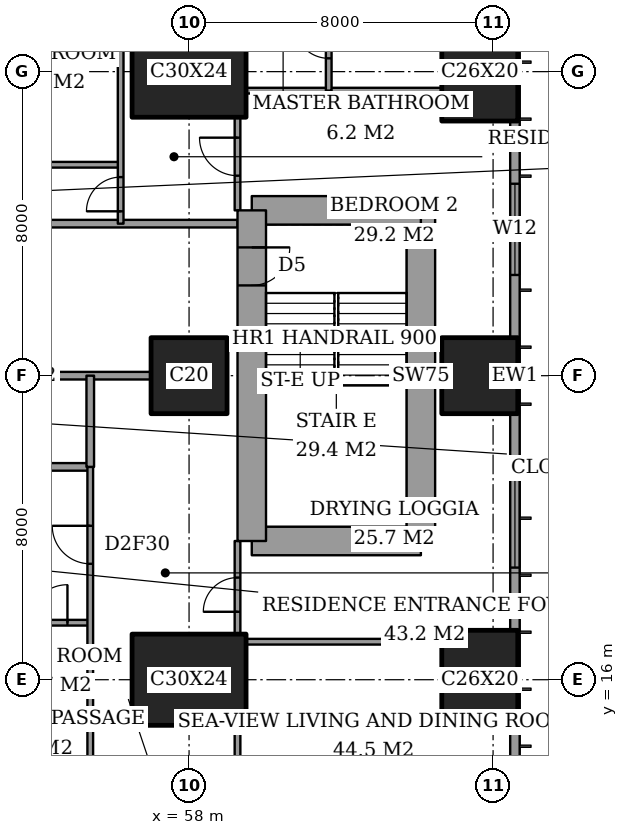
"""IFC4 building model, lengths in metres.
Left out: names, types, materials, properties, quantities, classifications, styles, units other than length and angle.
Written with IfcOpenShell. Run it as: python <this file> out.ifc"""

import sys

from ifc_helpers import new_model, si_unit, direction, frame, frame_2d, origin, origin_2d, place, context, subcontext, project, spatial, rectangle, extrude, element, fill, save


model = new_model("IFC4")
c1 = context("Model", 3, precision=1e-05, world=origin(), true_north=direction((0.0, 1.0)))
c2 = subcontext(c1, "Body", "Model", "MODEL_VIEW")
j1 = project(units=[si_unit("LENGTHUNIT", "METRE"), si_unit("PLANEANGLEUNIT", "RADIAN")], contexts=[c1])
p1 = place(None, origin())
s1 = spatial("IfcSite", under=j1, at=p1, CompositionType="ELEMENT")
p2 = place(p1, origin())
s2 = spatial("IfcBuilding", under=s1, at=p2, CompositionType="ELEMENT")
p3 = place(p2, frame((0.0, 0.0, 128.6)))
s3 = spatial("IfcBuildingStorey", under=s2, at=p3, CompositionType="ELEMENT", Elevation=128.6)
p4 = place(p3, frame((58.0, 16.0, 0.0), z_axis=(0.0, 0.0, 1.0), x_axis=(1.0, 0.0, 0.0)))
e1 = element("IfcColumn", 1, at=p4, inside=s3, PredefinedType="COLUMN", context=c2, shape_type="SweptSolid", body=[
    extrude(rectangle(XDim=3.0, YDim=2.4, at=origin_2d()), origin(), (0.0, 0.0, 1.0), 3.6),
])
p5 = place(p3, frame((58.0, 24.0, 0.0), z_axis=(0.0, 0.0, 1.0), x_axis=(1.0, 0.0, 0.0)))
e2 = element("IfcColumn", 2, at=p5, inside=s3, PredefinedType="COLUMN", context=c2, shape_type="SweptSolid", body=[
    extrude(rectangle(XDim=2.0, YDim=2.0, at=origin_2d()), origin(), (0.0, 0.0, 1.0), 3.6),
])
p6 = place(p3, frame((58.0, 32.0, 0.0), z_axis=(0.0, 0.0, 1.0), x_axis=(1.0, 0.0, 0.0)))
e3 = element("IfcColumn", 3, at=p6, inside=s3, PredefinedType="COLUMN", context=c2, shape_type="SweptSolid", body=[
    extrude(rectangle(XDim=3.0, YDim=2.4, at=origin_2d()), origin(), (0.0, 0.0, 1.0), 3.6),
])
p7 = place(p3, frame((65.65, 16.0, 0.0), z_axis=(0.0, 0.0, 1.0), x_axis=(0.0, 1.0, 0.0)))
e4 = element("IfcColumn", 4, at=p7, inside=s3, PredefinedType="COLUMN", context=c2, shape_type="SweptSolid", body=[
    extrude(rectangle(XDim=2.6, YDim=2.0, at=origin_2d()), origin(), (0.0, 0.0, 1.0), 3.6),
])
p8 = place(p3, frame((65.65, 24.0, 0.0), z_axis=(0.0, 0.0, 1.0), x_axis=(1.0, 0.0, 0.0)))
e5 = element("IfcColumn", 5, at=p8, inside=s3, PredefinedType="COLUMN", context=c2, shape_type="SweptSolid", body=[
    extrude(rectangle(XDim=2.0, YDim=2.0, at=origin_2d()), origin(), (0.0, 0.0, 1.0), 3.6),
])
p9 = place(p3, frame((65.65, 32.0, 0.0), z_axis=(0.0, 0.0, 1.0), x_axis=(0.0, 1.0, 0.0)))
e6 = element("IfcColumn", 6, at=p9, inside=s3, PredefinedType="COLUMN", context=c2, shape_type="SweptSolid", body=[
    extrude(rectangle(XDim=2.6, YDim=2.0, at=origin_2d()), origin(), (0.0, 0.0, 1.0), 3.6),
])
p10 = place(p3, frame((59.65, 19.65, 0.0), z_axis=(0.0, 0.0, 1.0), x_axis=(1.0, 0.0, 0.0)))
e7 = element("IfcWall", 7, at=p10, inside=s3, PredefinedType="SHEAR", context=c2, shape_type="SweptSolid", body=[
    extrude(rectangle(XDim=4.45, YDim=0.75, at=frame_2d((2.225, 0.0))), origin(), (0.0, 0.0, 1.0), 3.6),
])
p11 = place(p3, frame((64.1, 19.65, 0.0), z_axis=(0.0, 0.0, 1.0), x_axis=(0.0, 1.0, 0.0)))
e8 = element("IfcWall", 8, at=p11, inside=s3, PredefinedType="SHEAR", context=c2, shape_type="SweptSolid", body=[
    extrude(rectangle(XDim=8.7, YDim=0.75, at=frame_2d((4.35, 0.0))), origin(), (0.0, 0.0, 1.0), 3.6),
])
p12 = place(p3, frame((64.1, 28.35, 0.0), z_axis=(0.0, 0.0, 1.0), x_axis=(-1.0, 0.0, 0.0)))
e9 = element("IfcWall", 9, at=p12, inside=s3, PredefinedType="SHEAR", context=c2, shape_type="SweptSolid", body=[
    extrude(rectangle(XDim=4.45, YDim=0.75, at=frame_2d((2.225, 0.0))), origin(), (0.0, 0.0, 1.0), 3.6),
])
p13 = place(p3, frame((59.65, 28.35, 0.0), z_axis=(0.0, 0.0, 1.0), x_axis=(0.0, -1.0, 0.0)))
e10 = element("IfcWall", 10, at=p13, inside=s3, PredefinedType="SHEAR", context=c2, shape_type="SweptSolid", body=[
    extrude(rectangle(XDim=8.7, YDim=0.75, at=frame_2d((4.35, 0.0))), origin(), (0.0, 0.0, 1.0), 3.6),
])
p14 = place(p13, frame((0.975, 0.0, 0.0)))
e11 = element("IfcOpeningElement", 11, at=p14, cuts=e10, PredefinedType="OPENING", context=c2, shape_type="SweptSolid", body=[
    extrude(rectangle(XDim=1.0, YDim=2.1, at=frame_2d((0.5, 1.05))), frame((0.0, 0.385, 0.0), z_axis=(0.0, -1.0, 0.0), x_axis=(1.0, 0.0, 0.0)), (0.0, 0.0, 1.0), 0.77),
])
p15 = place(p3, frame((66.575, 3.175, 0.0), z_axis=(0.0, 0.0, 1.0), x_axis=(0.0, 1.0, 0.0)))
e12 = element("IfcWall", 12, at=p15, inside=s3, PredefinedType="SOLIDWALL", context=c2, shape_type="SweptSolid", body=[
    extrude(rectangle(XDim=41.65, YDim=0.25, at=frame_2d((20.825, 0.0))), origin(), (0.0, 0.0, 1.0), 3.6),
])
p16 = place(p15, frame((0.775, 0.0, 0.4)))
e13 = element("IfcOpeningElement", 13, at=p16, cuts=e12, PredefinedType="OPENING", context=c2, shape_type="SweptSolid", body=[
    extrude(rectangle(XDim=2.4, YDim=2.2, at=frame_2d((1.2, 1.1))), frame((0.0, 0.135, 0.0), z_axis=(0.0, -1.0, 0.0), x_axis=(1.0, 0.0, 0.0)), (0.0, 0.0, 1.0), 0.27),
])
p17 = place(p15, frame((6.125, 0.0, 0.4)))
e14 = element("IfcOpeningElement", 14, at=p17, cuts=e12, PredefinedType="OPENING", context=c2, shape_type="SweptSolid", body=[
    extrude(rectangle(XDim=1.2, YDim=2.2, at=frame_2d((0.6, 1.1))), frame((0.0, 0.135, 0.0), z_axis=(0.0, -1.0, 0.0), x_axis=(1.0, 0.0, 0.0)), (0.0, 0.0, 1.0), 0.27),
])
p18 = place(p15, frame((8.375, 0.0, 0.4)))
e15 = element("IfcOpeningElement", 15, at=p18, cuts=e12, PredefinedType="OPENING", context=c2, shape_type="SweptSolid", body=[
    extrude(rectangle(XDim=2.4, YDim=2.2, at=frame_2d((1.2, 1.1))), frame((0.0, 0.135, 0.0), z_axis=(0.0, -1.0, 0.0), x_axis=(1.0, 0.0, 0.0)), (0.0, 0.0, 1.0), 0.27),
])
p19 = place(p15, frame((15.775, 0.0, 0.4)))
e16 = element("IfcOpeningElement", 16, at=p19, cuts=e12, PredefinedType="OPENING", context=c2, shape_type="SweptSolid", body=[
    extrude(rectangle(XDim=2.4, YDim=2.2, at=frame_2d((1.2, 1.1))), frame((0.0, 0.135, 0.0), z_axis=(0.0, -1.0, 0.0), x_axis=(1.0, 0.0, 0.0)), (0.0, 0.0, 1.0), 0.27),
])
p20 = place(p15, frame((23.475, 0.0, 0.4)))
e17 = element("IfcOpeningElement", 17, at=p20, cuts=e12, PredefinedType="OPENING", context=c2, shape_type="SweptSolid", body=[
    extrude(rectangle(XDim=2.4, YDim=2.2, at=frame_2d((1.2, 1.1))), frame((0.0, 0.135, 0.0), z_axis=(0.0, -1.0, 0.0), x_axis=(1.0, 0.0, 0.0)), (0.0, 0.0, 1.0), 0.27),
])
p21 = place(p15, frame((30.975, 0.0, 0.4)))
e18 = element("IfcOpeningElement", 18, at=p21, cuts=e12, PredefinedType="OPENING", context=c2, shape_type="SweptSolid", body=[
    extrude(rectangle(XDim=2.4, YDim=2.2, at=frame_2d((1.2, 1.1))), frame((0.0, 0.135, 0.0), z_axis=(0.0, -1.0, 0.0), x_axis=(1.0, 0.0, 0.0)), (0.0, 0.0, 1.0), 0.27),
])
p22 = place(p15, frame((34.5, 0.0, 0.4)))
e19 = element("IfcOpeningElement", 19, at=p22, cuts=e12, PredefinedType="OPENING", context=c2, shape_type="SweptSolid", body=[
    extrude(rectangle(XDim=1.2, YDim=2.2, at=frame_2d((0.6, 1.1))), frame((0.0, 0.135, 0.0), z_axis=(0.0, -1.0, 0.0), x_axis=(1.0, 0.0, 0.0)), (0.0, 0.0, 1.0), 0.27),
])
p23 = place(p15, frame((38.475, 0.0, 0.4)))
e20 = element("IfcOpeningElement", 20, at=p23, cuts=e12, PredefinedType="OPENING", context=c2, shape_type="SweptSolid", body=[
    extrude(rectangle(XDim=2.4, YDim=2.2, at=frame_2d((1.2, 1.1))), frame((0.0, 0.135, 0.0), z_axis=(0.0, -1.0, 0.0), x_axis=(1.0, 0.0, 0.0)), (0.0, 0.0, 1.0), 0.27),
])
p24 = place(p3, frame((55.4, 15.0, 0.0), z_axis=(0.0, 0.0, 1.0), x_axis=(1.0, 0.0, 0.0)))
e21 = element("IfcWall", 21, at=p24, inside=s3, PredefinedType="PARTITIONING", context=c2, shape_type="SweptSolid", body=[
    extrude(rectangle(XDim=1.1, YDim=0.15, at=frame_2d((0.55, 0.0))), origin(), (0.0, 0.0, 1.0), 3.35),
])
p25 = place(p3, frame((59.5, 17.0, 0.0), z_axis=(0.0, 0.0, 1.0), x_axis=(1.0, 0.0, 0.0)))
e22 = element("IfcWall", 22, at=p25, inside=s3, PredefinedType="PARTITIONING", context=c2, shape_type="SweptSolid", body=[
    extrude(rectangle(XDim=5.15, YDim=0.15, at=frame_2d((2.575, 0.0))), origin(), (0.0, 0.0, 1.0), 3.35),
])
p26 = place(p3, frame((51.6, 17.5, 0.0), z_axis=(0.0, 0.0, 1.0), x_axis=(1.0, 0.0, 0.0)))
e23 = element("IfcWall", 23, at=p26, inside=s3, PredefinedType="PARTITIONING", context=c2, shape_type="SweptSolid", body=[
    extrude(rectangle(XDim=3.8, YDim=0.15, at=frame_2d((1.9, 0.0))), origin(), (0.0, 0.0, 1.0), 3.35),
])
p27 = place(p26, frame((2.2, 0.0, 0.0)))
e24 = element("IfcOpeningElement", 24, at=p27, cuts=e23, PredefinedType="OPENING", context=c2, shape_type="SweptSolid", body=[
    extrude(rectangle(XDim=1.0, YDim=2.1, at=frame_2d((0.5, 1.05))), frame((0.0, 0.085, 0.0), z_axis=(0.0, -1.0, 0.0), x_axis=(1.0, 0.0, 0.0)), (0.0, 0.0, 1.0), 0.17),
])
p28 = place(p3, frame((51.2, 21.6, 0.0), z_axis=(0.0, 0.0, 1.0), x_axis=(1.0, 0.0, 0.0)))
e25 = element("IfcWall", 25, at=p28, inside=s3, PredefinedType="PARTITIONING", context=c2, shape_type="SweptSolid", body=[
    extrude(rectangle(XDim=4.2, YDim=0.2, at=frame_2d((2.1, 0.0))), origin(), (0.0, 0.0, 1.0), 3.35),
])
p29 = place(p28, frame((1.65, 0.0, 0.0)))
e26 = element("IfcOpeningElement", 26, at=p29, cuts=e25, PredefinedType="OPENING", context=c2, shape_type="SweptSolid", body=[
    extrude(rectangle(XDim=0.9, YDim=2.1, at=frame_2d((0.45, 1.05))), frame((0.0, 0.11, 0.0), z_axis=(0.0, -1.0, 0.0), x_axis=(1.0, 0.0, 0.0)), (0.0, 0.0, 1.0), 0.22),
])
p30 = place(p3, frame((51.0, 24.0, 0.0), z_axis=(0.0, 0.0, 1.0), x_axis=(1.0, 0.0, 0.0)))
e27 = element("IfcWall", 27, at=p30, inside=s3, PredefinedType="PARTITIONING", context=c2, shape_type="SweptSolid", body=[
    extrude(rectangle(XDim=6.0, YDim=0.2, at=frame_2d((3.0, 0.0))), origin(), (0.0, 0.0, 1.0), 3.35),
])
p31 = place(p3, frame((42.0, 28.0, 0.0), z_axis=(0.0, 0.0, 1.0), x_axis=(1.0, 0.0, 0.0)))
e28 = element("IfcWall", 28, at=p31, inside=s3, PredefinedType="PARTITIONING", context=c2, shape_type="SweptSolid", body=[
    extrude(rectangle(XDim=17.275, YDim=0.2, at=frame_2d((8.637, 0.0))), origin(), (0.0, 0.0, 1.0), 3.35),
])
p32 = place(p31, frame((9.5, 0.0, 0.0)))
e29 = element("IfcOpeningElement", 29, at=p32, cuts=e28, PredefinedType="OPENING", context=c2, shape_type="SweptSolid", body=[
    extrude(rectangle(XDim=1.2, YDim=2.4, at=frame_2d((0.6, 1.2))), frame((0.0, 0.11, 0.0), z_axis=(0.0, -1.0, 0.0), x_axis=(1.0, 0.0, 0.0)), (0.0, 0.0, 1.0), 0.22),
])
p33 = place(p3, frame((48.0, 29.55, 0.0), z_axis=(0.0, 0.0, 1.0), x_axis=(1.0, 0.0, 0.0)))
e30 = element("IfcWall", 30, at=p33, inside=s3, PredefinedType="PARTITIONING", context=c2, shape_type="SweptSolid", body=[
    extrude(rectangle(XDim=8.2, YDim=0.15, at=frame_2d((4.1, 0.0))), origin(), (0.0, 0.0, 1.0), 3.35),
])
p34 = place(p33, frame((4.2, 0.0, 0.0)))
e31 = element("IfcOpeningElement", 31, at=p34, cuts=e30, PredefinedType="OPENING", context=c2, shape_type="SweptSolid", body=[
    extrude(rectangle(XDim=1.0, YDim=2.1, at=frame_2d((0.5, 1.05))), frame((0.0, 0.085, 0.0), z_axis=(0.0, -1.0, 0.0), x_axis=(1.0, 0.0, 0.0)), (0.0, 0.0, 1.0), 0.17),
])
p35 = place(p33, frame((1.35, 0.0, 0.0)))
e32 = element("IfcOpeningElement", 32, at=p35, cuts=e30, PredefinedType="OPENING", context=c2, shape_type="SweptSolid", body=[
    extrude(rectangle(XDim=0.9, YDim=2.1, at=frame_2d((0.45, 1.05))), frame((0.0, 0.085, 0.0), z_axis=(0.0, -1.0, 0.0), x_axis=(1.0, 0.0, 0.0)), (0.0, 0.0, 1.0), 0.17),
])
p36 = place(p3, frame((59.5, 31.5, 0.0), z_axis=(0.0, 0.0, 1.0), x_axis=(1.0, 0.0, 0.0)))
e33 = element("IfcWall", 33, at=p36, inside=s3, PredefinedType="PARTITIONING", context=c2, shape_type="SweptSolid", body=[
    extrude(rectangle(XDim=5.15, YDim=0.15, at=frame_2d((2.575, 0.0))), origin(), (0.0, 0.0, 1.0), 3.35),
])
p37 = place(p3, frame((55.4, 21.6, 0.0), z_axis=(0.0, 0.0, 1.0), x_axis=(0.0, 1.0, 0.0)))
e34 = element("IfcWall", 34, at=p37, inside=s3, PredefinedType="PARTITIONING", context=c2, shape_type="SweptSolid", body=[
    extrude(rectangle(XDim=2.4, YDim=0.2, at=frame_2d((1.2, 0.0))), origin(), (0.0, 0.0, 1.0), 3.35),
])
p38 = place(p3, frame((55.4, 10.8, 0.0), z_axis=(0.0, 0.0, 1.0), x_axis=(0.0, 1.0, 0.0)))
e35 = element("IfcWall", 35, at=p38, inside=s3, PredefinedType="PARTITIONING", context=c2, shape_type="SweptSolid", body=[
    extrude(rectangle(XDim=10.8, YDim=0.15, at=frame_2d((5.4, 0.0))), origin(), (0.0, 0.0, 1.0), 3.35),
])
p39 = place(p38, frame((8.25, 0.0, 0.0)))
e36 = element("IfcOpeningElement", 36, at=p39, cuts=e35, PredefinedType="OPENING", context=c2, shape_type="SweptSolid", body=[
    extrude(rectangle(XDim=1.0, YDim=2.1, at=frame_2d((0.5, 1.05))), frame((0.0, 0.085, 0.0), z_axis=(0.0, -1.0, 0.0), x_axis=(1.0, 0.0, 0.0)), (0.0, 0.0, 1.0), 0.17),
])
p40 = place(p3, frame((56.2, 28.0, 0.0), z_axis=(0.0, 0.0, 1.0), x_axis=(0.0, 1.0, 0.0)))
e37 = element("IfcWall", 37, at=p40, inside=s3, PredefinedType="PARTITIONING", context=c2, shape_type="SweptSolid", body=[
    extrude(rectangle(XDim=9.4, YDim=0.15, at=frame_2d((4.7, 0.0))), origin(), (0.0, 0.0, 1.0), 3.35),
])
p41 = place(p40, frame((0.325, 0.0, 0.0)))
e38 = element("IfcOpeningElement", 38, at=p41, cuts=e37, PredefinedType="OPENING", context=c2, shape_type="SweptSolid", body=[
    extrude(rectangle(XDim=0.9, YDim=2.1, at=frame_2d((0.45, 1.05))), frame((0.0, 0.085, 0.0), z_axis=(0.0, -1.0, 0.0), x_axis=(1.0, 0.0, 0.0)), (0.0, 0.0, 1.0), 0.17),
])
p42 = place(p3, frame((59.275, 10.8, 0.0), z_axis=(0.0, 0.0, 1.0), x_axis=(0.0, 1.0, 0.0)))
e39 = element("IfcWall", 39, at=p42, inside=s3, PredefinedType="PARTITIONING", context=c2, shape_type="SweptSolid", body=[
    extrude(rectangle(XDim=4.0, YDim=0.15, at=frame_2d((2.0, 0.0))), origin(), (0.0, 0.0, 1.0), 3.35),
])
p43 = place(p3, frame((59.275, 17.2, 0.0), z_axis=(0.0, 0.0, 1.0), x_axis=(0.0, 1.0, 0.0)))
e40 = element("IfcWall", 40, at=p43, inside=s3, PredefinedType="PARTITIONING", context=c2, shape_type="SweptSolid", body=[
    extrude(rectangle(XDim=2.45, YDim=0.15, at=frame_2d((1.225, 0.0))), origin(), (0.0, 0.0, 1.0), 3.35),
])
p44 = place(p43, frame((0.587, 0.0, 0.0)))
e41 = element("IfcOpeningElement", 41, at=p44, cuts=e40, PredefinedType="OPENING", context=c2, shape_type="SweptSolid", body=[
    extrude(rectangle(XDim=0.9, YDim=2.1, at=frame_2d((0.45, 1.05))), frame((0.0, 0.085, 0.0), z_axis=(0.0, -1.0, 0.0), x_axis=(1.0, 0.0, 0.0)), (0.0, 0.0, 1.0), 0.17),
])
p45 = place(p3, frame((59.275, 28.35, 0.0), z_axis=(0.0, 0.0, 1.0), x_axis=(0.0, 1.0, 0.0)))
e42 = element("IfcWall", 42, at=p45, inside=s3, PredefinedType="PARTITIONING", context=c2, shape_type="SweptSolid", body=[
    extrude(rectangle(XDim=2.45, YDim=0.15, at=frame_2d((1.225, 0.0))), origin(), (0.0, 0.0, 1.0), 3.35),
])
p46 = place(p45, frame((0.913, 0.0, 0.0)))
e43 = element("IfcOpeningElement", 43, at=p46, cuts=e42, PredefinedType="OPENING", context=c2, shape_type="SweptSolid", body=[
    extrude(rectangle(XDim=1.0, YDim=2.1, at=frame_2d((0.5, 1.05))), frame((0.0, 0.085, 0.0), z_axis=(0.0, -1.0, 0.0), x_axis=(1.0, 0.0, 0.0)), (0.0, 0.0, 1.0), 0.17),
])
p47 = place(p3, frame((61.675, 31.5, 0.0), z_axis=(0.0, 0.0, 1.0), x_axis=(0.0, 1.0, 0.0)))
e44 = element("IfcWall", 44, at=p47, inside=s3, PredefinedType="PARTITIONING", context=c2, shape_type="SweptSolid", body=[
    extrude(rectangle(XDim=2.6, YDim=0.15, at=frame_2d((1.3, 0.0))), origin(), (0.0, 0.0, 1.0), 3.35),
])
p48 = place(p47, frame((0.85, 0.0, 0.0)))
e45 = element("IfcOpeningElement", 45, at=p48, cuts=e44, PredefinedType="OPENING", context=c2, shape_type="SweptSolid", body=[
    extrude(rectangle(XDim=0.9, YDim=2.1, at=frame_2d((0.45, 1.05))), frame((0.0, 0.085, 0.0), z_axis=(0.0, -1.0, 0.0), x_axis=(1.0, 0.0, 0.0)), (0.0, 0.0, 1.0), 0.17),
])
p49 = place(p19, origin())
e46 = element("IfcWindow", 46, at=p49, inside=s3, PartitioningType="SINGLE_PANEL", PredefinedType="WINDOW", context=c2, shape_type="SweptSolid", body=[
    extrude(rectangle(XDim=2.4, YDim=2.2, at=frame_2d((1.2, 1.1))), frame((0.0, 0.03, 0.0), z_axis=(0.0, -1.0, 0.0), x_axis=(1.0, 0.0, 0.0)), (0.0, 0.0, 1.0), 0.06),
])
fill(e16, e46)
p50 = place(p20, origin())
e47 = element("IfcWindow", 47, at=p50, inside=s3, PartitioningType="SINGLE_PANEL", PredefinedType="WINDOW", context=c2, shape_type="SweptSolid", body=[
    extrude(rectangle(XDim=2.4, YDim=2.2, at=frame_2d((1.2, 1.1))), frame((0.0, 0.03, 0.0), z_axis=(0.0, -1.0, 0.0), x_axis=(1.0, 0.0, 0.0)), (0.0, 0.0, 1.0), 0.06),
])
fill(e17, e47)
p51 = place(p44, origin())
e48 = element("IfcDoor", 48, at=p51, inside=s3, OperationType="SINGLE_SWING_RIGHT", PredefinedType="DOOR", context=c2, shape_type="SweptSolid", body=[
    extrude(rectangle(XDim=0.9, YDim=2.1, at=frame_2d((0.45, 1.05))), frame((0.0, 0.025, 0.0), z_axis=(0.0, -1.0, 0.0), x_axis=(1.0, 0.0, 0.0)), (0.0, 0.0, 1.0), 0.05),
])
fill(e41, e48)
p52 = place(p39, origin())
e49 = element("IfcDoor", 49, at=p52, inside=s3, OperationType="SINGLE_SWING_LEFT", PredefinedType="DOOR", context=c2, shape_type="SweptSolid", body=[
    extrude(rectangle(XDim=1.0, YDim=2.1, at=frame_2d((0.5, 1.05))), frame((0.0, 0.025, 0.0), z_axis=(0.0, -1.0, 0.0), x_axis=(1.0, 0.0, 0.0)), (0.0, 0.0, 1.0), 0.05),
])
fill(e36, e49)
p53 = place(p27, origin())
e50 = element("IfcDoor", 50, at=p53, inside=s3, OperationType="SINGLE_SWING_LEFT", PredefinedType="DOOR", context=c2, shape_type="SweptSolid", body=[
    extrude(rectangle(XDim=1.0, YDim=2.1, at=frame_2d((0.5, 1.05))), frame((0.0, 0.025, 0.0), z_axis=(0.0, -1.0, 0.0), x_axis=(1.0, 0.0, 0.0)), (0.0, 0.0, 1.0), 0.05),
])
fill(e24, e50)
p54 = place(p48, origin())
e51 = element("IfcDoor", 51, at=p54, inside=s3, OperationType="SINGLE_SWING_LEFT", PredefinedType="DOOR", context=c2, shape_type="SweptSolid", body=[
    extrude(rectangle(XDim=0.9, YDim=2.1, at=frame_2d((0.45, 1.05))), frame((0.0, 0.025, 0.0), z_axis=(0.0, -1.0, 0.0), x_axis=(1.0, 0.0, 0.0)), (0.0, 0.0, 1.0), 0.05),
])
fill(e45, e51)
p55 = place(p46, origin())
e52 = element("IfcDoor", 52, at=p55, inside=s3, OperationType="SINGLE_SWING_LEFT", PredefinedType="DOOR", context=c2, shape_type="SweptSolid", body=[
    extrude(rectangle(XDim=1.0, YDim=2.1, at=frame_2d((0.5, 1.05))), frame((0.0, 0.025, 0.0), z_axis=(0.0, -1.0, 0.0), x_axis=(1.0, 0.0, 0.0)), (0.0, 0.0, 1.0), 0.05),
])
fill(e43, e52)
p56 = place(p41, origin())
e53 = element("IfcDoor", 53, at=p56, inside=s3, OperationType="SINGLE_SWING_RIGHT", PredefinedType="DOOR", context=c2, shape_type="SweptSolid", body=[
    extrude(rectangle(XDim=0.9, YDim=2.1, at=frame_2d((0.45, 1.05))), frame((0.0, 0.025, 0.0), z_axis=(0.0, -1.0, 0.0), x_axis=(1.0, 0.0, 0.0)), (0.0, 0.0, 1.0), 0.05),
])
fill(e38, e53)
p57 = place(p14, origin())
e54 = element("IfcDoor", 54, at=p57, inside=s3, OperationType="SINGLE_SWING_RIGHT", PredefinedType="DOOR", context=c2, shape_type="SweptSolid", body=[
    extrude(rectangle(XDim=1.0, YDim=2.1, at=frame_2d((0.5, 1.05))), frame((0.0, 0.025, 0.0), z_axis=(0.0, -1.0, 0.0), x_axis=(1.0, 0.0, 0.0)), (0.0, 0.0, 1.0), 0.05),
])
fill(e11, e54)
save(model, sys.argv[1])
